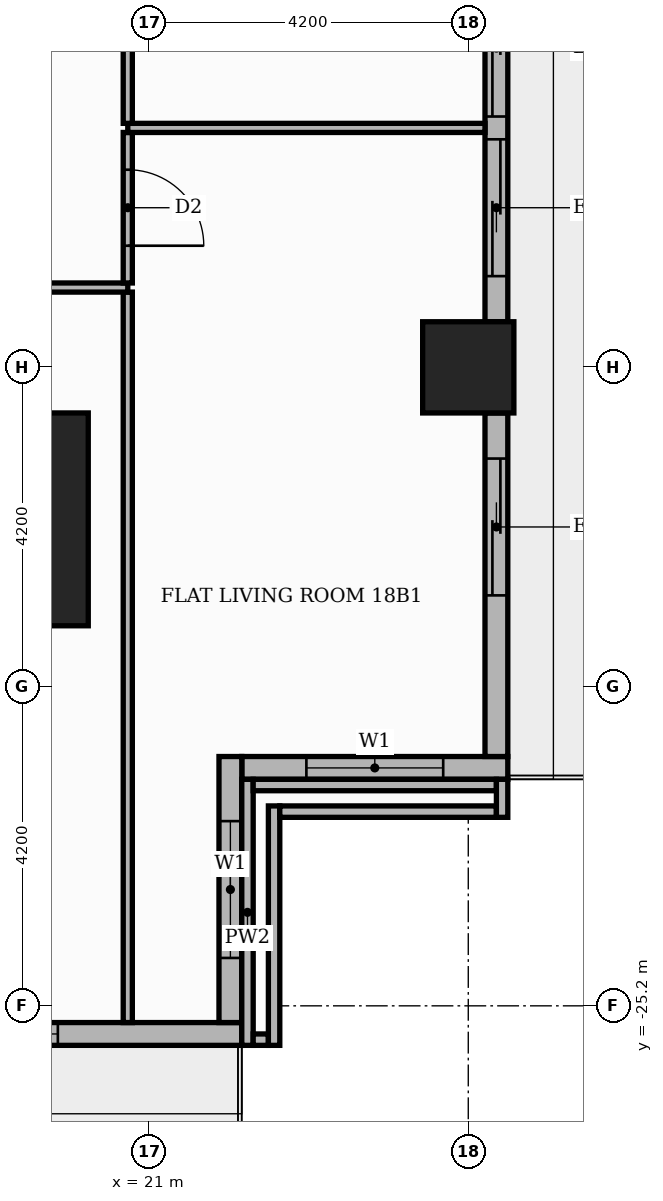
"""IFC4 building model, lengths in metres.
Left out: names, types, materials, properties, quantities, classifications, styles, units other than length and angle.
Written with IfcOpenShell. Run it as: python <this file> out.ifc"""

import sys

from ifc_helpers import new_model, si_unit, direction, frame, frame_2d, origin, origin_2d, place, context, subcontext, project, spatial, rectangle, extrude, element, fill, save


model = new_model("IFC4")
c1 = context("Model", 3, precision=1e-05, world=origin(), true_north=direction((0.0, 1.0)))
c2 = subcontext(c1, "Body", "Model", "MODEL_VIEW")
j1 = project(units=[si_unit("LENGTHUNIT", "METRE"), si_unit("PLANEANGLEUNIT", "RADIAN")], contexts=[c1])
p1 = place(None, origin())
s1 = spatial("IfcSite", under=j1, at=p1, CompositionType="ELEMENT")
p2 = place(p1, origin())
s2 = spatial("IfcBuilding", under=s1, at=p2, CompositionType="ELEMENT")
p3 = place(p2, frame((0.0, 0.0, 79.2)))
s3 = spatial("IfcBuildingStorey", under=s2, at=p3, CompositionType="ELEMENT", Elevation=79.2)
p4 = place(p3, frame((18.8, -18.8, 0.0), z_axis=(0.0, 0.0, 1.0), x_axis=(1.0, 0.0, 0.0)))
e1 = element("IfcColumn", 1, at=p4, inside=s3, PredefinedType="COLUMN", context=c2, shape_type="SweptSolid", body=[
    extrude(rectangle(XDim=2.8, YDim=2.8, at=origin_2d()), origin(), (0.0, 0.0, 1.0), 3.9),
])
p5 = place(p3, frame((25.2, -16.8, 0.0), z_axis=(0.0, 0.0, 1.0), x_axis=(1.0, 0.0, 0.0)))
e2 = element("IfcColumn", 2, at=p5, inside=s3, PredefinedType="COLUMN", context=c2, shape_type="SweptSolid", body=[
    extrude(rectangle(XDim=1.2, YDim=1.2, at=origin_2d()), origin(), (0.0, 0.0, 1.0), 3.9),
])
p6 = place(p3, frame((22.22, -22.07, 0.0), z_axis=(0.0, 0.0, 1.0), x_axis=(1.0, 0.0, 0.0)))
e3 = element("IfcWall", 3, at=p6, inside=s3, PredefinedType="STANDARD", context=c2, shape_type="SweptSolid", body=[
    extrude(rectangle(XDim=3.5, YDim=0.3, at=frame_2d((1.75, 0.0))), origin(), (0.0, 0.0, 1.0), 3.48),
])
p7 = place(p6, frame((0.85, 0.0, 0.9)))
e4 = element("IfcOpeningElement", 4, at=p7, cuts=e3, PredefinedType="OPENING", context=c2, shape_type="SweptSolid", body=[
    extrude(rectangle(XDim=1.8, YDim=2.1, at=frame_2d((0.9, 1.05))), frame((0.0, 0.16, 0.0), z_axis=(0.0, -1.0, 0.0), x_axis=(1.0, 0.0, 0.0)), (0.0, 0.0, 1.0), 0.32),
])
p8 = place(p3, frame((25.57, -21.92, 0.0), z_axis=(0.0, 0.0, 1.0), x_axis=(0.0, 1.0, 0.0)))
e5 = element("IfcWall", 5, at=p8, inside=s3, PredefinedType="STANDARD", context=c2, shape_type="SweptSolid", body=[
    extrude(rectangle(XDim=4.52, YDim=0.3, at=frame_2d((2.26, 0.0))), origin(), (0.0, 0.0, 1.0), 3.48),
])
p9 = place(p8, frame((2.12, 0.0, 0.0)))
e6 = element("IfcOpeningElement", 6, at=p9, cuts=e5, PredefinedType="OPENING", context=c2, shape_type="SweptSolid", body=[
    extrude(rectangle(XDim=1.8, YDim=2.4, at=frame_2d((0.9, 1.2))), frame((0.0, 0.16, 0.0), z_axis=(0.0, -1.0, 0.0), x_axis=(1.0, 0.0, 0.0)), (0.0, 0.0, 1.0), 0.32),
])
p10 = place(p3, frame((25.57, -16.2, 0.0), z_axis=(0.0, 0.0, 1.0), x_axis=(0.0, 1.0, 0.0)))
e7 = element("IfcWall", 7, at=p10, inside=s3, PredefinedType="STANDARD", context=c2, shape_type="SweptSolid", body=[
    extrude(rectangle(XDim=7.2, YDim=0.3, at=frame_2d((3.6, 0.0))), origin(), (0.0, 0.0, 1.0), 3.48),
])
p11 = place(p10, frame((0.6, 0.0, 0.0)))
e8 = element("IfcOpeningElement", 8, at=p11, cuts=e7, PredefinedType="OPENING", context=c2, shape_type="SweptSolid", body=[
    extrude(rectangle(XDim=1.8, YDim=2.4, at=frame_2d((0.9, 1.2))), frame((0.0, 0.16, 0.0), z_axis=(0.0, -1.0, 0.0), x_axis=(1.0, 0.0, 0.0)), (0.0, 0.0, 1.0), 0.32),
])
p12 = place(p10, frame((2.7, 0.0, 0.0)))
e9 = element("IfcOpeningElement", 9, at=p12, cuts=e7, PredefinedType="OPENING", context=c2, shape_type="SweptSolid", body=[
    extrude(rectangle(XDim=1.8, YDim=2.4, at=frame_2d((0.9, 1.2))), frame((0.0, 0.16, 0.0), z_axis=(0.0, -1.0, 0.0), x_axis=(1.0, 0.0, 0.0)), (0.0, 0.0, 1.0), 0.32),
])
p13 = place(p10, frame((4.8, 0.0, 0.9)))
e10 = element("IfcOpeningElement", 10, at=p13, cuts=e7, PredefinedType="OPENING", context=c2, shape_type="SweptSolid", body=[
    extrude(rectangle(XDim=1.8, YDim=2.1, at=frame_2d((0.9, 1.05))), frame((0.0, 0.16, 0.0), z_axis=(0.0, -1.0, 0.0), x_axis=(1.0, 0.0, 0.0)), (0.0, 0.0, 1.0), 0.32),
])
p14 = place(p3, frame((17.4, -25.57, 0.0), z_axis=(0.0, 0.0, 1.0), x_axis=(1.0, 0.0, 0.0)))
e11 = element("IfcWall", 11, at=p14, inside=s3, PredefinedType="STANDARD", context=c2, shape_type="SweptSolid", body=[
    extrude(rectangle(XDim=4.82, YDim=0.3, at=frame_2d((2.41, 0.0))), origin(), (0.0, 0.0, 1.0), 3.48),
])
p15 = place(p14, frame((0.6, 0.0, 0.9)))
e12 = element("IfcOpeningElement", 12, at=p15, cuts=e11, PredefinedType="OPENING", context=c2, shape_type="SweptSolid", body=[
    extrude(rectangle(XDim=1.8, YDim=2.1, at=frame_2d((0.9, 1.05))), frame((0.0, 0.16, 0.0), z_axis=(0.0, -1.0, 0.0), x_axis=(1.0, 0.0, 0.0)), (0.0, 0.0, 1.0), 0.32),
])
p16 = place(p3, frame((22.07, -25.42, 0.0), z_axis=(0.0, 0.0, 1.0), x_axis=(0.0, 1.0, 0.0)))
e13 = element("IfcWall", 13, at=p16, inside=s3, PredefinedType="STANDARD", context=c2, shape_type="SweptSolid", body=[
    extrude(rectangle(XDim=3.5, YDim=0.3, at=frame_2d((1.75, 0.0))), origin(), (0.0, 0.0, 1.0), 3.48),
])
p17 = place(p16, frame((0.85, 0.0, 0.9)))
e14 = element("IfcOpeningElement", 14, at=p17, cuts=e13, PredefinedType="OPENING", context=c2, shape_type="SweptSolid", body=[
    extrude(rectangle(XDim=1.8, YDim=2.1, at=frame_2d((0.9, 1.05))), frame((0.0, 0.16, 0.0), z_axis=(0.0, -1.0, 0.0), x_axis=(1.0, 0.0, 0.0)), (0.0, 0.0, 1.0), 0.32),
])
p18 = place(p3, frame((22.295, -25.72, 0.0), z_axis=(0.0, 0.0, 1.0), x_axis=(0.0, 1.0, 0.0)))
e15 = element("IfcWall", 15, at=p18, inside=s3, PredefinedType="PARAPET", context=c2, shape_type="SweptSolid", body=[
    extrude(rectangle(XDim=3.5, YDim=0.15, at=frame_2d((1.75, 0.0))), origin(), (0.0, 0.0, 1.0), 1.1),
])
p19 = place(p3, frame((22.37, -25.645, 0.0), z_axis=(0.0, 0.0, 1.0), x_axis=(1.0, 0.0, 0.0)))
e16 = element("IfcWall", 16, at=p19, inside=s3, PredefinedType="PARAPET", context=c2, shape_type="SweptSolid", body=[
    extrude(rectangle(XDim=0.2, YDim=0.15, at=frame_2d((0.1, 0.0))), origin(), (0.0, 0.0, 1.0), 1.1),
])
p20 = place(p3, frame((22.37, -22.295, 0.0), z_axis=(0.0, 0.0, 1.0), x_axis=(1.0, 0.0, 0.0)))
e17 = element("IfcWall", 17, at=p20, inside=s3, PredefinedType="PARAPET", context=c2, shape_type="SweptSolid", body=[
    extrude(rectangle(XDim=3.2, YDim=0.15, at=frame_2d((1.6, 0.0))), origin(), (0.0, 0.0, 1.0), 1.1),
])
p21 = place(p3, frame((22.645, -25.72, 0.0), z_axis=(0.0, 0.0, 1.0), x_axis=(0.0, 1.0, 0.0)))
e18 = element("IfcWall", 18, at=p21, inside=s3, PredefinedType="PARAPET", context=c2, shape_type="SweptSolid", body=[
    extrude(rectangle(XDim=3.15, YDim=0.15, at=frame_2d((1.575, 0.0))), origin(), (0.0, 0.0, 1.0), 1.1),
])
p22 = place(p3, frame((22.72, -22.645, 0.0), z_axis=(0.0, 0.0, 1.0), x_axis=(1.0, 0.0, 0.0)))
e19 = element("IfcWall", 19, at=p22, inside=s3, PredefinedType="PARAPET", context=c2, shape_type="SweptSolid", body=[
    extrude(rectangle(XDim=2.85, YDim=0.15, at=frame_2d((1.425, 0.0))), origin(), (0.0, 0.0, 1.0), 1.1),
])
p23 = place(p3, frame((25.645, -22.72, 0.0), z_axis=(0.0, 0.0, 1.0), x_axis=(0.0, 1.0, 0.0)))
e20 = element("IfcWall", 20, at=p23, inside=s3, PredefinedType="PARAPET", context=c2, shape_type="SweptSolid", body=[
    extrude(rectangle(XDim=0.5, YDim=0.15, at=frame_2d((0.25, 0.0))), origin(), (0.0, 0.0, 1.0), 1.1),
])
p24 = place(p3, frame((20.72, -25.42, 0.0), z_axis=(0.0, 0.0, 1.0), x_axis=(0.0, 1.0, 0.0)))
e21 = element("IfcWall", 21, at=p24, inside=s3, PredefinedType="PARTITIONING", context=c2, shape_type="SweptSolid", body=[
    extrude(rectangle(XDim=9.61, YDim=0.12, at=frame_2d((4.805, 0.0))), origin(), (0.0, 0.0, 1.0), 3.48),
])
p25 = place(p3, frame((13.75, -15.75, 0.0), z_axis=(0.0, 0.0, 1.0), x_axis=(1.0, 0.0, 0.0)))
e22 = element("IfcWall", 22, at=p25, inside=s3, PredefinedType="PARTITIONING", context=c2, shape_type="SweptSolid", body=[
    extrude(rectangle(XDim=6.97, YDim=0.12, at=frame_2d((3.485, 0.0))), origin(), (0.0, 0.0, 1.0), 3.48),
])
p26 = place(p25, frame((2.935, 0.0, 0.0)))
e23 = element("IfcOpeningElement", 23, at=p26, cuts=e22, PredefinedType="OPENING", context=c2, shape_type="SweptSolid", body=[
    extrude(rectangle(XDim=1.0, YDim=2.1, at=frame_2d((0.5, 1.05))), frame((0.0, 0.07, 0.0), z_axis=(0.0, -1.0, 0.0), x_axis=(1.0, 0.0, 0.0)), (0.0, 0.0, 1.0), 0.14),
])
p27 = place(p3, frame((20.72, -15.69, 0.0), z_axis=(0.0, 0.0, 1.0), x_axis=(0.0, 1.0, 0.0)))
e24 = element("IfcWall", 24, at=p27, inside=s3, PredefinedType="PARTITIONING", context=c2, shape_type="SweptSolid", body=[
    extrude(rectangle(XDim=1.98, YDim=0.12, at=frame_2d((0.99, 0.0))), origin(), (0.0, 0.0, 1.0), 3.48),
])
p28 = place(p27, frame((0.49, 0.0, 0.0)))
e25 = element("IfcOpeningElement", 25, at=p28, cuts=e24, PredefinedType="OPENING", context=c2, shape_type="SweptSolid", body=[
    extrude(rectangle(XDim=1.0, YDim=2.1, at=frame_2d((0.5, 1.05))), frame((0.0, 0.07, 0.0), z_axis=(0.0, -1.0, 0.0), x_axis=(1.0, 0.0, 0.0)), (0.0, 0.0, 1.0), 0.14),
])
p29 = place(p3, frame((20.72, -13.65, 0.0), z_axis=(0.0, 0.0, 1.0), x_axis=(1.0, 0.0, 0.0)))
e26 = element("IfcWall", 26, at=p29, inside=s3, PredefinedType="PARTITIONING", context=c2, shape_type="SweptSolid", body=[
    extrude(rectangle(XDim=4.7, YDim=0.12, at=frame_2d((2.35, 0.0))), origin(), (0.0, 0.0, 1.0), 3.48),
])
p30 = place(p3, frame((20.72, -13.59, 0.0), z_axis=(0.0, 0.0, 1.0), x_axis=(0.0, 1.0, 0.0)))
e27 = element("IfcWall", 27, at=p30, inside=s3, PredefinedType="PARTITIONING", context=c2, shape_type="SweptSolid", body=[
    extrude(rectangle(XDim=4.08, YDim=0.12, at=frame_2d((2.04, 0.0))), origin(), (0.0, 0.0, 1.0), 3.48),
])
p31 = place(p30, frame((1.59, 0.0, 0.0)))
e28 = element("IfcOpeningElement", 28, at=p31, cuts=e27, PredefinedType="OPENING", context=c2, shape_type="SweptSolid", body=[
    extrude(rectangle(XDim=0.9, YDim=2.1, at=frame_2d((0.45, 1.05))), frame((0.0, 0.07, 0.0), z_axis=(0.0, -1.0, 0.0), x_axis=(1.0, 0.0, 0.0)), (0.0, 0.0, 1.0), 0.14),
])
p32 = place(p7, origin())
e29 = element("IfcWindow", 29, at=p32, inside=s3, PartitioningType="SINGLE_PANEL", PredefinedType="WINDOW", context=c2, shape_type="SweptSolid", body=[
    extrude(rectangle(XDim=1.8, YDim=2.1, at=frame_2d((0.9, 1.05))), frame((0.0, 0.03, 0.0), z_axis=(0.0, -1.0, 0.0), x_axis=(1.0, 0.0, 0.0)), (0.0, 0.0, 1.0), 0.06),
])
fill(e4, e29)
p33 = place(p9, origin())
e30 = element("IfcDoor", 30, at=p33, inside=s3, OperationType="SLIDING_TO_RIGHT", PredefinedType="DOOR", context=c2, shape_type="SweptSolid", body=[
    extrude(rectangle(XDim=1.8, YDim=2.4, at=frame_2d((0.9, 1.2))), frame((0.0, 0.025, 0.0), z_axis=(0.0, -1.0, 0.0), x_axis=(1.0, 0.0, 0.0)), (0.0, 0.0, 1.0), 0.05),
])
fill(e6, e30)
p34 = place(p11, origin())
e31 = element("IfcDoor", 31, at=p34, inside=s3, OperationType="SLIDING_TO_LEFT", PredefinedType="DOOR", context=c2, shape_type="SweptSolid", body=[
    extrude(rectangle(XDim=1.8, YDim=2.4, at=frame_2d((0.9, 1.2))), frame((0.0, 0.025, 0.0), z_axis=(0.0, -1.0, 0.0), x_axis=(1.0, 0.0, 0.0)), (0.0, 0.0, 1.0), 0.05),
])
fill(e8, e31)
p35 = place(p12, origin())
e32 = element("IfcDoor", 32, at=p35, inside=s3, OperationType="SLIDING_TO_RIGHT", PredefinedType="DOOR", context=c2, shape_type="SweptSolid", body=[
    extrude(rectangle(XDim=1.8, YDim=2.4, at=frame_2d((0.9, 1.2))), frame((0.0, 0.025, 0.0), z_axis=(0.0, -1.0, 0.0), x_axis=(1.0, 0.0, 0.0)), (0.0, 0.0, 1.0), 0.05),
])
fill(e9, e32)
p36 = place(p15, origin())
e33 = element("IfcWindow", 33, at=p36, inside=s3, PartitioningType="SINGLE_PANEL", PredefinedType="WINDOW", context=c2, shape_type="SweptSolid", body=[
    extrude(rectangle(XDim=1.8, YDim=2.1, at=frame_2d((0.9, 1.05))), frame((0.0, 0.03, 0.0), z_axis=(0.0, -1.0, 0.0), x_axis=(1.0, 0.0, 0.0)), (0.0, 0.0, 1.0), 0.06),
])
fill(e12, e33)
p37 = place(p17, origin())
e34 = element("IfcWindow", 34, at=p37, inside=s3, PartitioningType="SINGLE_PANEL", PredefinedType="WINDOW", context=c2, shape_type="SweptSolid", body=[
    extrude(rectangle(XDim=1.8, YDim=2.1, at=frame_2d((0.9, 1.05))), frame((0.0, 0.03, 0.0), z_axis=(0.0, -1.0, 0.0), x_axis=(1.0, 0.0, 0.0)), (0.0, 0.0, 1.0), 0.06),
])
fill(e14, e34)
p38 = place(p28, frame((1.0, 0.0, 0.0), z_axis=(0.0, 0.0, 1.0), x_axis=(-1.0, 0.0, 0.0)))
e35 = element("IfcDoor", 35, at=p38, inside=s3, OperationType="SINGLE_SWING_LEFT", PredefinedType="DOOR", context=c2, shape_type="SweptSolid", body=[
    extrude(rectangle(XDim=1.0, YDim=2.1, at=frame_2d((0.5, 1.05))), frame((0.0, 0.025, 0.0), z_axis=(0.0, -1.0, 0.0), x_axis=(1.0, 0.0, 0.0)), (0.0, 0.0, 1.0), 0.05),
])
fill(e25, e35)
save(model, sys.argv[1])
